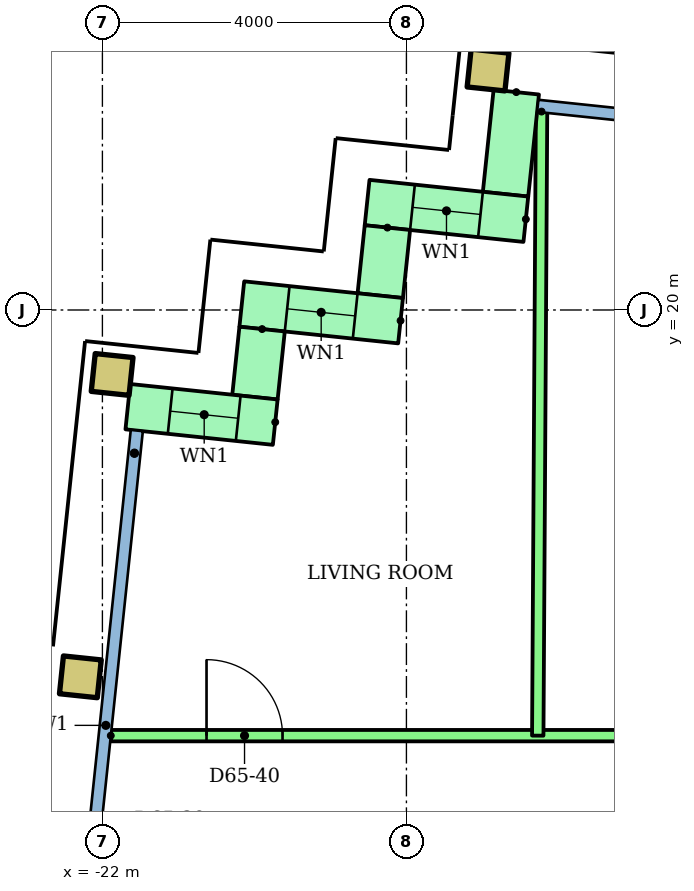
"""IFC4 building model, lengths in metres.
Left out: names, types, materials, properties, quantities, classifications, styles, units other than length and angle.
Written with IfcOpenShell. Run it as: python <this file> out.ifc"""

import sys

from ifc_helpers import new_model, si_unit, direction, frame, frame_2d, origin, origin_2d, place, context, subcontext, project, spatial, rectangle, hollow_rectangle, extrude, element, fill, save


model = new_model("IFC4")
c1 = context("Model", 3, precision=1e-05, world=origin(), true_north=direction((0.0, 1.0)))
c2 = subcontext(c1, "Body", "Model", "MODEL_VIEW")
j1 = project(units=[si_unit("LENGTHUNIT", "METRE"), si_unit("PLANEANGLEUNIT", "RADIAN")], contexts=[c1])
p1 = place(None, origin())
s1 = spatial("IfcSite", under=j1, at=p1, CompositionType="ELEMENT")
p2 = place(p1, origin())
s2 = spatial("IfcBuilding", under=s1, at=p2, CompositionType="ELEMENT")
p3 = place(p2, frame((0.0, 0.0, 253.1)))
s3 = spatial("IfcBuildingStorey", under=s2, at=p3, CompositionType="ELEMENT", Elevation=253.1)
for number, where, z_axis, x_axis in (
    (1, (-22.29, 15.174, 0.0), (0.0, 0.0, 1.0), (0.995, -0.105, 0.0)),
    (2, (-21.872, 19.152, 0.0), (0.0, 0.0, 1.0), (0.995, -0.105, 0.0)),
    (3, (-16.926, 23.157, 0.0), (0.0, 0.0, 1.0), (0.995, -0.105, 0.0)),
):
    element("IfcColumn", number, at=place(p3, frame(where, z_axis=z_axis, x_axis=x_axis)), inside=s3, PredefinedType="COLUMN", context=c2, shape_type="SweptSolid", body=[
        extrude(hollow_rectangle(XDim=0.5, YDim=0.5, WallThickness=0.025, at=origin_2d()), origin(), (0.0, 0.0, 1.0), 3.2),
    ])
p4 = place(p3, frame((-16.555, 22.866, 0.0), z_axis=(0.0, 0.0, 1.0), x_axis=(-0.104515354875, -0.994523273029, 0.0)))
e4 = element("IfcWall", 4, at=p4, inside=s3, PredefinedType="STANDARD", context=c2, shape_type="SweptSolid", body=[
    extrude(rectangle(XDim=1.35, YDim=0.6, at=frame_2d((0.675, 0.0))), origin(), (0.0, 0.0, 1.0), 2.92),
])
p5 = place(p3, frame((-16.429, 21.194, 0.0), z_axis=(0.0, 0.0, 1.0), x_axis=(-0.994522640205, 0.104521376379, 0.0)))
e5 = element("IfcWall", 5, at=p5, inside=s3, PredefinedType="STANDARD", context=c2, shape_type="SweptSolid", body=[
    extrude(rectangle(XDim=2.1, YDim=0.6, at=frame_2d((1.05, 0.0))), origin(), (0.0, 0.0, 1.0), 2.92),
])
p6 = place(p5, frame((0.6, 0.0, 0.9)))
e6 = element("IfcOpeningElement", 6, at=p6, cuts=e5, PredefinedType="OPENING", context=c2, shape_type="SweptSolid", body=[
    extrude(rectangle(XDim=0.9, YDim=1.5, at=frame_2d((0.45, 0.75))), frame((0.0, 0.31, 0.0), z_axis=(0.0, -1.0, 0.0), x_axis=(1.0, 0.0, 0.0)), (0.0, 0.0, 1.0), 0.62),
])
p7 = place(p3, frame((-18.25, 21.084, 0.0), z_axis=(0.0, 0.0, 1.0), x_axis=(-0.104416541099, -0.994533652495, 0.0)))
e7 = element("IfcWall", 7, at=p7, inside=s3, PredefinedType="STANDARD", context=c2, shape_type="SweptSolid", body=[
    extrude(rectangle(XDim=0.9, YDim=0.6, at=frame_2d((0.45, 0.0))), origin(), (0.0, 0.0, 1.0), 2.92),
])
p8 = place(p3, frame((-18.077, 19.859, 0.0), z_axis=(0.0, 0.0, 1.0), x_axis=(-0.994522640205, 0.104521376379, 0.0)))
e8 = element("IfcWall", 8, at=p8, inside=s3, PredefinedType="STANDARD", context=c2, shape_type="SweptSolid", body=[
    extrude(rectangle(XDim=2.1, YDim=0.6, at=frame_2d((1.05, 0.0))), origin(), (0.0, 0.0, 1.0), 2.92),
])
p9 = place(p8, frame((0.6, 0.0, 0.9)))
e9 = element("IfcOpeningElement", 9, at=p9, cuts=e8, PredefinedType="OPENING", context=c2, shape_type="SweptSolid", body=[
    extrude(rectangle(XDim=0.9, YDim=1.5, at=frame_2d((0.45, 0.75))), frame((0.0, 0.31, 0.0), z_axis=(0.0, -1.0, 0.0), x_axis=(1.0, 0.0, 0.0)), (0.0, 0.0, 1.0), 0.62),
])
p10 = place(p3, frame((-19.899, 19.749, 0.0), z_axis=(0.0, 0.0, 1.0), x_axis=(-0.104741284723, -0.994499503909, 0.0)))
e10 = element("IfcWall", 10, at=p10, inside=s3, PredefinedType="STANDARD", context=c2, shape_type="SweptSolid", body=[
    extrude(rectangle(XDim=0.9, YDim=0.6, at=frame_2d((0.45, 0.0))), origin(), (0.0, 0.0, 1.0), 2.92),
])
p11 = place(p3, frame((-19.726, 18.524, 0.0), z_axis=(0.0, 0.0, 1.0), x_axis=(-0.994534226826, 0.104411070641, 0.0)))
e11 = element("IfcWall", 11, at=p11, inside=s3, PredefinedType="STANDARD", context=c2, shape_type="SweptSolid", body=[
    extrude(rectangle(XDim=1.95, YDim=0.6, at=frame_2d((0.975, 0.0))), origin(), (0.0, 0.0, 1.0), 2.92),
])
p12 = place(p11, frame((0.49, 0.0, 0.9)))
e12 = element("IfcOpeningElement", 12, at=p12, cuts=e11, PredefinedType="OPENING", context=c2, shape_type="SweptSolid", body=[
    extrude(rectangle(XDim=0.9, YDim=1.5, at=frame_2d((0.45, 0.75))), frame((0.0, 0.31, 0.0), z_axis=(0.0, -1.0, 0.0), x_axis=(1.0, 0.0, 0.0)), (0.0, 0.0, 1.0), 0.62),
])
p13 = place(p3, frame((-21.89, 14.4, 0.0)))
e13 = element("IfcWall", 13, at=p13, inside=s3, PredefinedType="PARTITIONING", context=c2, shape_type="SweptSolid", body=[
    extrude(rectangle(XDim=11.89, YDim=0.15, at=frame_2d((5.945, 0.0))), origin(), (0.0, 0.0, 1.0), 2.4),
])
p14 = place(p13, frame((1.26, 0.0, 0.0)))
e14 = element("IfcOpeningElement", 14, at=p14, cuts=e13, PredefinedType="OPENING", context=c2, shape_type="SweptSolid", body=[
    extrude(rectangle(XDim=1.0, YDim=2.1, at=frame_2d((0.5, 1.05))), frame((0.0, 0.085, 0.0), z_axis=(0.0, -1.0, 0.0), x_axis=(1.0, 0.0, 0.0)), (0.0, 0.0, 1.0), 0.17),
])
p15 = place(p13, frame((8.304, 0.0, 0.0)))
e15 = element("IfcOpeningElement", 15, at=p15, cuts=e13, PredefinedType="OPENING", context=c2, shape_type="SweptSolid", body=[
    extrude(rectangle(XDim=0.9, YDim=2.1, at=frame_2d((0.45, 1.05))), frame((0.0, 0.085, 0.0), z_axis=(0.0, -1.0, 0.0), x_axis=(1.0, 0.0, 0.0)), (0.0, 0.0, 1.0), 0.17),
])
p16 = place(p3, frame((-16.222, 22.61, 0.0), z_axis=(0.0, 0.0, 1.0), x_axis=(-0.006095634594, -0.999981421447, 0.0)))
e16 = element("IfcWall", 16, at=p16, inside=s3, PredefinedType="PARTITIONING", context=c2, shape_type="SweptSolid", body=[
    extrude(rectangle(XDim=8.211, YDim=0.15, at=frame_2d((4.105, 0.0))), origin(), (0.0, 0.0, 1.0), 2.4),
])
p17 = place(p6, origin())
e17 = element("IfcWindow", 17, at=p17, inside=s3, PartitioningType="SINGLE_PANEL", PredefinedType="WINDOW", context=c2, shape_type="SweptSolid", body=[
    extrude(rectangle(XDim=0.9, YDim=1.5, at=frame_2d((0.45, 0.75))), frame((0.0, 0.03, 0.0), z_axis=(0.0, -1.0, 0.0), x_axis=(1.0, 0.0, 0.0)), (0.0, 0.0, 1.0), 0.06),
])
fill(e6, e17)
p18 = place(p9, origin())
e18 = element("IfcWindow", 18, at=p18, inside=s3, PartitioningType="SINGLE_PANEL", PredefinedType="WINDOW", context=c2, shape_type="SweptSolid", body=[
    extrude(rectangle(XDim=0.9, YDim=1.5, at=frame_2d((0.45, 0.75))), frame((0.0, 0.03, 0.0), z_axis=(0.0, -1.0, 0.0), x_axis=(1.0, 0.0, 0.0)), (0.0, 0.0, 1.0), 0.06),
])
fill(e9, e18)
p19 = place(p12, origin())
e19 = element("IfcWindow", 19, at=p19, inside=s3, PartitioningType="SINGLE_PANEL", PredefinedType="WINDOW", context=c2, shape_type="SweptSolid", body=[
    extrude(rectangle(XDim=0.9, YDim=1.5, at=frame_2d((0.45, 0.75))), frame((0.0, 0.03, 0.0), z_axis=(0.0, -1.0, 0.0), x_axis=(1.0, 0.0, 0.0)), (0.0, 0.0, 1.0), 0.06),
])
fill(e12, e19)
p20 = place(p14, origin())
e20 = element("IfcDoor", 20, at=p20, inside=s3, OperationType="SINGLE_SWING_LEFT", PredefinedType="DOOR", context=c2, shape_type="SweptSolid", body=[
    extrude(rectangle(XDim=1.0, YDim=2.1, at=frame_2d((0.5, 1.05))), frame((0.0, 0.025, 0.0), z_axis=(0.0, -1.0, 0.0), x_axis=(1.0, 0.0, 0.0)), (0.0, 0.0, 1.0), 0.05),
])
fill(e14, e20)
save(model, sys.argv[1])
